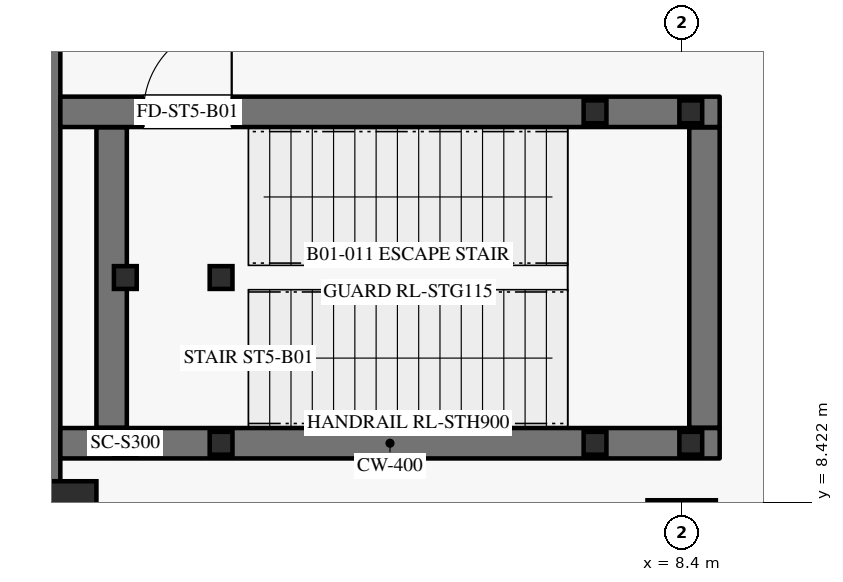
"""IFC4 building model, lengths in metres.
Left out: names, types, materials, properties, quantities, classifications, styles, units other than length and angle.
Written with IfcOpenShell. Run it as: python <this file> out.ifc"""

import sys

from ifc_helpers import new_model, si_unit, direction, frame, frame_2d, origin, origin_2d, place, context, subcontext, project, spatial, rectangle, hollow_rectangle, circle, extrude, element, fill, save


model = new_model("IFC4")
c1 = context("Model", 3, precision=1e-05, world=origin(), true_north=direction((0.0, 1.0)))
c2 = subcontext(c1, "Body", "Model", "MODEL_VIEW")
j1 = project(units=[si_unit("LENGTHUNIT", "METRE"), si_unit("PLANEANGLEUNIT", "RADIAN")], contexts=[c1])
p1 = place(None, origin())
s1 = spatial("IfcSite", under=j1, at=p1, CompositionType="ELEMENT")
p2 = place(p1, origin())
s2 = spatial("IfcBuilding", under=s1, at=p2, CompositionType="ELEMENT")
p3 = place(p2, frame((0.0, 0.0, -5.4)))
s3 = spatial("IfcBuildingStorey", under=s2, at=p3, CompositionType="ELEMENT", Elevation=-5.4)
p4 = place(p3, frame((0.0, 8.0, 0.0), z_axis=(0.0, 0.0, 1.0), x_axis=(1.0, 0.0, 0.0)))
e1 = element("IfcColumn", 1, at=p4, inside=s3, PredefinedType="COLUMN", context=c2, shape_type="SweptSolid", body=[
    extrude(circle(Radius=0.7, at=origin_2d()), origin(), (0.0, 0.0, 1.0), 5.4),
])
p5 = place(p3, frame((8.4, 8.0, 0.0), z_axis=(0.0, 0.0, 1.0), x_axis=(1.0, 0.0, 0.0)))
e2 = element("IfcColumn", 2, at=p5, inside=s3, PredefinedType="COLUMN", context=c2, shape_type="SweptSolid", body=[
    extrude(rectangle(XDim=0.9, YDim=0.9, at=origin_2d()), origin(), (0.0, 0.0, 1.0), 5.4),
])
p6 = place(p3, frame((0.0, 8.7, 0.0), z_axis=(0.0, 0.0, 1.0), x_axis=(0.0, 1.0, 0.0)))
e3 = element("IfcWall", 3, at=p6, inside=s3, PredefinedType="USERDEFINED", context=c2, shape_type="SweptSolid", body=[
    extrude(rectangle(XDim=6.85, YDim=0.45, at=frame_2d((3.425, 0.0))), origin(), (0.0, 0.0, 1.0), 4.3),
])
p7 = place(p3, frame((0.225, 9.2, 0.0), z_axis=(0.0, 0.0, 1.0), x_axis=(1.0, 0.0, 0.0)))
e4 = element("IfcWall", 4, at=p7, inside=s3, PredefinedType="SHEAR", context=c2, shape_type="SweptSolid", body=[
    extrude(rectangle(XDim=8.675, YDim=0.4, at=frame_2d((4.337, 0.0))), origin(), (0.0, 0.0, 1.0), 4.995),
])
p8 = place(p3, frame((8.7, 9.405, 0.0), z_axis=(0.0, 0.0, 1.0), x_axis=(0.0, 1.0, 0.0)))
e5 = element("IfcWall", 5, at=p8, inside=s3, PredefinedType="SHEAR", context=c2, shape_type="SweptSolid", body=[
    extrude(rectangle(XDim=3.95, YDim=0.4, at=frame_2d((1.975, 0.0))), origin(), (0.0, 0.0, 1.0), 4.995),
])
p9 = place(p3, frame((0.225, 13.56, 0.0), z_axis=(0.0, 0.0, 1.0), x_axis=(1.0, 0.0, 0.0)))
e6 = element("IfcWall", 6, at=p9, inside=s3, PredefinedType="SHEAR", context=c2, shape_type="SweptSolid", body=[
    extrude(rectangle(XDim=8.675, YDim=0.4, at=frame_2d((4.337, 0.0))), origin(), (0.0, 0.0, 1.0), 4.995),
])
p10 = place(p9, frame((1.095, 0.0, 0.0)))
e7 = element("IfcOpeningElement", 7, at=p10, cuts=e6, PredefinedType="OPENING", context=c2, shape_type="SweptSolid", body=[
    extrude(rectangle(XDim=1.16, YDim=2.2, at=frame_2d((0.58, 1.1))), frame((0.0, 0.21, 0.0), z_axis=(0.0, -1.0, 0.0), x_axis=(1.0, 0.0, 0.0)), (0.0, 0.0, 1.0), 0.42),
])
p11 = place(p3, frame((0.9, 9.405, 0.0), z_axis=(0.0, 0.0, 1.0), x_axis=(0.0, 1.0, 0.0)))
e8 = element("IfcWall", 8, at=p11, inside=s3, PredefinedType="SHEAR", context=c2, shape_type="SweptSolid", body=[
    extrude(rectangle(XDim=3.95, YDim=0.4, at=frame_2d((1.975, 0.0))), origin(), (0.0, 0.0, 1.0), 4.995),
])
for number, where, z_axis, x_axis in (
    (9, (1.08, 9.2, 0.0), (0.0, 0.0, 1.0), (1.0, 0.0, 0.0)),
    (10, (1.08, 11.38, 0.0), (0.0, 0.0, 1.0), (1.0, 0.0, 0.0)),
    (11, (2.34, 9.2, 0.0), (0.0, 0.0, 1.0), (1.0, 0.0, 0.0)),
    (12, (2.34, 11.38, 0.0), (0.0, 0.0, 1.0), (1.0, 0.0, 0.0)),
):
    element("IfcColumn", number, at=place(p3, frame(where, z_axis=z_axis, x_axis=x_axis)), inside=s3, PredefinedType="COLUMN", context=c2, shape_type="SweptSolid", body=[
        extrude(hollow_rectangle(XDim=0.3, YDim=0.3, WallThickness=0.012, at=origin_2d()), origin(), (0.0, 0.0, 1.0), 5.22),
    ])
for number, where, z_axis, x_axis in (
    (13, (7.26, 9.2, 0.0), (0.0, 0.0, 1.0), (1.0, 0.0, 0.0)),
    (14, (7.26, 13.56, 0.0), (0.0, 0.0, 1.0), (1.0, 0.0, 0.0)),
    (15, (8.52, 9.2, 0.0), (0.0, 0.0, 1.0), (1.0, 0.0, 0.0)),
    (16, (8.52, 13.56, 0.0), (0.0, 0.0, 1.0), (1.0, 0.0, 0.0)),
):
    element("IfcColumn", number, at=place(p3, frame(where, z_axis=z_axis, x_axis=x_axis)), inside=s3, PredefinedType="COLUMN", context=c2, shape_type="SweptSolid", body=[
        extrude(hollow_rectangle(XDim=0.3, YDim=0.3, WallThickness=0.012, at=origin_2d()), origin(), (0.0, 0.0, 1.0), 2.52),
    ])
p12 = place(p10, origin())
e17 = element("IfcDoor", 17, at=p12, inside=s3, OperationType="SINGLE_SWING_RIGHT", PredefinedType="DOOR", context=c2, shape_type="SweptSolid", body=[
    extrude(rectangle(XDim=1.16, YDim=2.2, at=frame_2d((0.58, 1.1))), frame((0.0, 0.025, 0.0), z_axis=(0.0, -1.0, 0.0), x_axis=(1.0, 0.0, 0.0)), (0.0, 0.0, 1.0), 0.05),
])
fill(e7, e17)
save(model, sys.argv[1])
